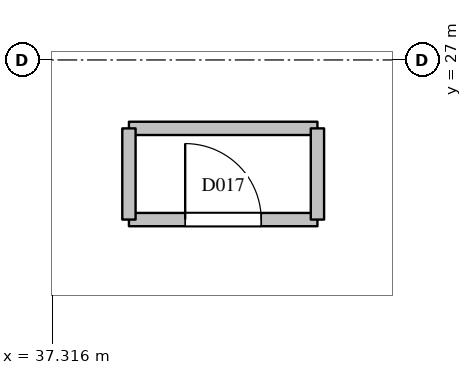
"""IFC4 building model, lengths in metres.
Left out: names, types, materials, properties, quantities, classifications, styles, units other than length and angle.
Written with IfcOpenShell. Run it as: python <this file> out.ifc"""

import sys

from ifc_helpers import new_model, si_unit, direction, frame, frame_2d, origin, place, context, subcontext, project, spatial, rectangle, extrude, element, fill, save


model = new_model("IFC4")
c1 = context("Model", 3, precision=1e-05, world=origin(), true_north=direction((0.0, 1.0)))
c2 = subcontext(c1, "Body", "Model", "MODEL_VIEW")
j1 = project(units=[si_unit("LENGTHUNIT", "METRE"), si_unit("PLANEANGLEUNIT", "RADIAN")], contexts=[c1])
p1 = place(None, origin())
s1 = spatial("IfcSite", under=j1, at=p1, CompositionType="ELEMENT")
p2 = place(p1, origin())
s2 = spatial("IfcBuilding", under=s1, at=p2, CompositionType="ELEMENT")
p3 = place(p2, frame((0.0, 0.0, 65.2)))
s3 = spatial("IfcBuildingStorey", under=s2, at=p3, CompositionType="ELEMENT", Elevation=65.2)
p4 = place(p3, frame((38.32, 24.9, 0.0), z_axis=(0.0, 0.0, 1.0), x_axis=(1.0, 0.0, 0.0)))
e1 = element("IfcWall", 1, at=p4, inside=s3, PredefinedType="PARTITIONING", context=c2, shape_type="SweptSolid", body=[
    extrude(rectangle(XDim=2.48, YDim=0.175, at=frame_2d((1.24, 0.0))), origin(), (0.0, 0.0, 1.0), 3.5),
])
p5 = place(p4, frame((0.74, 0.0, 0.0)))
e2 = element("IfcOpeningElement", 2, at=p5, cuts=e1, PredefinedType="OPENING", context=c2, shape_type="SweptSolid", body=[
    extrude(rectangle(XDim=1.0, YDim=2.1, at=frame_2d((0.5, 1.05))), frame((0.0, 0.097, 0.0), z_axis=(0.0, -1.0, 0.0), x_axis=(1.0, 0.0, 0.0)), (0.0, 0.0, 1.0), 0.195),
])
p6 = place(p3, frame((38.32, 26.1, 0.0), z_axis=(0.0, 0.0, 1.0), x_axis=(1.0, 0.0, 0.0)))
e3 = element("IfcWall", 3, at=p6, inside=s3, PredefinedType="PARTITIONING", context=c2, shape_type="SweptSolid", body=[
    extrude(rectangle(XDim=2.48, YDim=0.175, at=frame_2d((1.24, 0.0))), origin(), (0.0, 0.0, 1.0), 3.5),
])
for number, where, z_axis, x_axis in (
    (4, (38.32, 24.9, 0.0), (0.0, 0.0, 1.0), (0.0, 1.0, 0.0)),
    (5, (40.8, 24.9, 0.0), (0.0, 0.0, 1.0), (0.0, 1.0, 0.0)),
):
    element("IfcWall", number, at=place(p3, frame(where, z_axis=z_axis, x_axis=x_axis)), inside=s3, PredefinedType="PARTITIONING", context=c2, shape_type="SweptSolid", body=[
        extrude(rectangle(XDim=1.2, YDim=0.175, at=frame_2d((0.6, 0.0))), origin(), (0.0, 0.0, 1.0), 3.5),
    ])
p7 = place(p5, origin())
e6 = element("IfcDoor", 6, at=p7, inside=s3, OperationType="SINGLE_SWING_LEFT", PredefinedType="DOOR", context=c2, shape_type="SweptSolid", body=[
    extrude(rectangle(XDim=1.0, YDim=2.1, at=frame_2d((0.5, 1.05))), frame((0.0, 0.025, 0.0), z_axis=(0.0, -1.0, 0.0), x_axis=(1.0, 0.0, 0.0)), (0.0, 0.0, 1.0), 0.05),
])
fill(e2, e6)
save(model, sys.argv[1])
